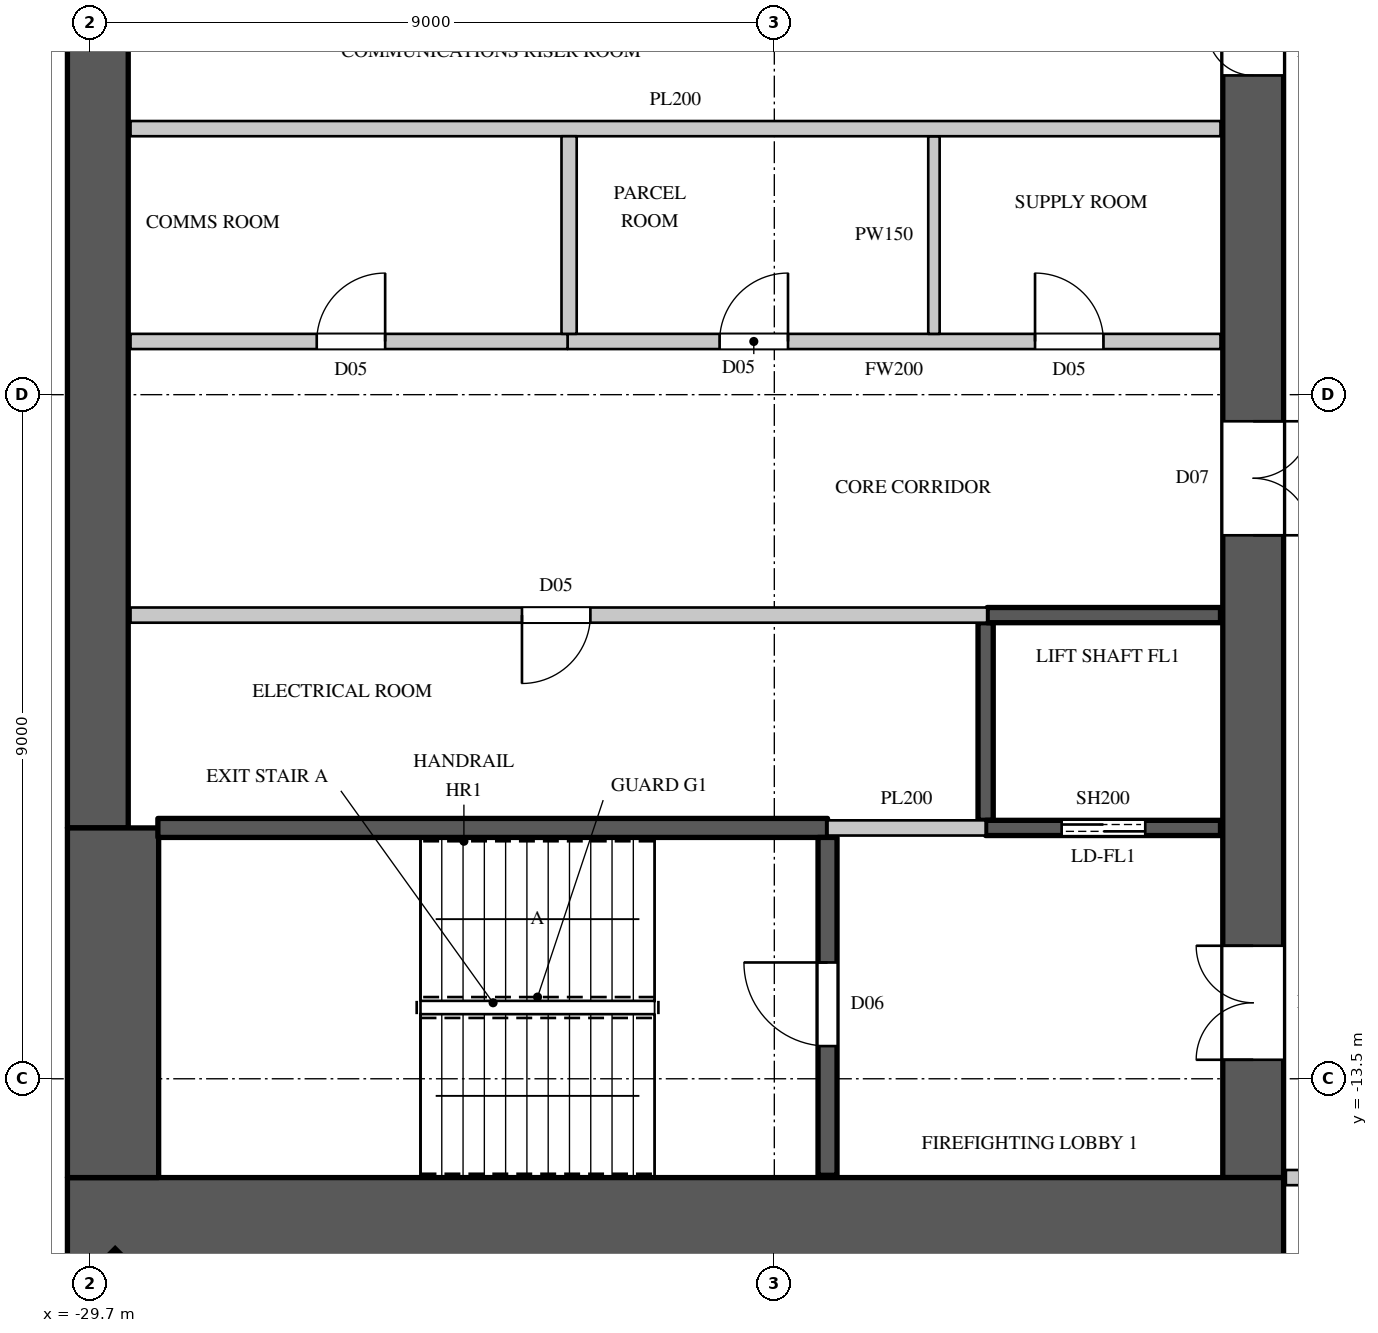
"""IFC4 building model, lengths in metres.
Left out: names, types, materials, properties, quantities, classifications, styles, units other than length and angle.
Written with IfcOpenShell. Run it as: python <this file> out.ifc"""

import sys

from ifc_helpers import new_model, si_unit, direction, frame, frame_2d, origin, origin_2d, place, context, subcontext, project, spatial, rectangle, extrude, element, fill, save


model = new_model("IFC4")
c1 = context("Model", 3, precision=1e-05, world=origin(), true_north=direction((0.0, 1.0)))
c2 = subcontext(c1, "Body", "Model", "MODEL_VIEW")
j1 = project(units=[si_unit("LENGTHUNIT", "METRE"), si_unit("PLANEANGLEUNIT", "RADIAN")], contexts=[c1])
p1 = place(None, origin())
s1 = spatial("IfcSite", under=j1, at=p1, CompositionType="ELEMENT")
p2 = place(p1, origin())
s2 = spatial("IfcBuilding", under=s1, at=p2, CompositionType="ELEMENT")
p3 = place(p2, frame((0.0, 0.0, 205.6)))
s3 = spatial("IfcBuildingStorey", under=s2, at=p3, CompositionType="ELEMENT", Elevation=205.6)
p4 = place(p3, frame((-29.443, -16.443, 0.0), z_axis=(0.0, 0.0, 1.0), x_axis=(0.707106781187, -0.707106781187, 0.0)))
e1 = element("IfcColumn", 1, at=p4, inside=s3, PredefinedType="COLUMN", context=c2, shape_type="SweptSolid", body=[
    extrude(rectangle(XDim=0.9, YDim=1.1, at=origin_2d()), origin(), (0.0, 0.0, 1.0), 4.1),
])
p5 = place(p3, frame((-30.0, -15.4, 0.0), z_axis=(0.0, 0.0, 1.0), x_axis=(1.0, 0.0, 0.0)))
e2 = element("IfcWall", 2, at=p5, inside=s3, PredefinedType="SHEAR", context=c2, shape_type="SweptSolid", body=[
    extrude(rectangle(XDim=16.0, YDim=1.2, at=frame_2d((8.0, 0.0))), origin(), (0.0, 0.0, 1.0), 4.1),
])
p6 = place(p3, frame((-14.4, -14.8, 0.0), z_axis=(0.0, 0.0, 1.0), x_axis=(0.0, 1.0, 0.0)))
e3 = element("IfcWall", 3, at=p6, inside=s3, PredefinedType="SHEAR", context=c2, shape_type="SweptSolid", body=[
    extrude(rectangle(XDim=29.6, YDim=0.8, at=frame_2d((14.8, 0.0))), origin(), (0.0, 0.0, 1.0), 4.1),
])
p7 = place(p6, frame((1.55, 0.0, 0.0)))
e4 = element("IfcOpeningElement", 4, at=p7, cuts=e3, PredefinedType="OPENING", context=c2, shape_type="SweptSolid", body=[
    extrude(rectangle(XDim=1.5, YDim=2.4, at=frame_2d((0.75, 1.2))), frame((0.0, 0.41, 0.0), z_axis=(0.0, -1.0, 0.0), x_axis=(1.0, 0.0, 0.0)), (0.0, 0.0, 1.0), 0.82),
])
p8 = place(p6, frame((26.55, 0.0, 0.0)))
e5 = element("IfcOpeningElement", 5, at=p8, cuts=e3, PredefinedType="OPENING", context=c2, shape_type="SweptSolid", body=[
    extrude(rectangle(XDim=1.5, YDim=2.4, at=frame_2d((0.75, 1.2))), frame((0.0, 0.41, 0.0), z_axis=(0.0, -1.0, 0.0), x_axis=(1.0, 0.0, 0.0)), (0.0, 0.0, 1.0), 0.82),
])
p9 = place(p6, frame((8.45, 0.0, 0.0)))
e6 = element("IfcOpeningElement", 6, at=p9, cuts=e3, PredefinedType="OPENING", context=c2, shape_type="SweptSolid", body=[
    extrude(rectangle(XDim=1.5, YDim=2.4, at=frame_2d((0.75, 1.2))), frame((0.0, 0.41, 0.0), z_axis=(0.0, -1.0, 0.0), x_axis=(1.0, 0.0, 0.0)), (0.0, 0.0, 1.0), 0.82),
])
p10 = place(p6, frame((19.65, 0.0, 0.0)))
e7 = element("IfcOpeningElement", 7, at=p10, cuts=e3, PredefinedType="OPENING", context=c2, shape_type="SweptSolid", body=[
    extrude(rectangle(XDim=1.5, YDim=2.4, at=frame_2d((0.75, 1.2))), frame((0.0, 0.41, 0.0), z_axis=(0.0, -1.0, 0.0), x_axis=(1.0, 0.0, 0.0)), (0.0, 0.0, 1.0), 0.82),
])
p11 = place(p6, frame((14.5, 0.0, 0.0)))
e8 = element("IfcOpeningElement", 8, at=p11, cuts=e3, PredefinedType="OPENING", context=c2, shape_type="SweptSolid", body=[
    extrude(rectangle(XDim=0.6, YDim=2.0, at=frame_2d((0.3, 1.0))), frame((0.0, 0.41, 0.0), z_axis=(0.0, -1.0, 0.0), x_axis=(1.0, 0.0, 0.0)), (0.0, 0.0, 1.0), 0.82),
])
p12 = place(p3, frame((-29.6, -10.2, 0.0), z_axis=(0.0, 0.0, 1.0), x_axis=(0.0, 1.0, 0.0)))
e9 = element("IfcWall", 9, at=p12, inside=s3, PredefinedType="SHEAR", context=c2, shape_type="SweptSolid", body=[
    extrude(rectangle(XDim=20.4, YDim=0.8, at=frame_2d((10.2, 0.0))), origin(), (0.0, 0.0, 1.0), 4.1),
])
p13 = place(p3, frame((-29.4, -14.8, 0.0), z_axis=(0.0, 0.0, 1.0), x_axis=(0.0, 1.0, 0.0)))
e10 = element("IfcWall", 10, at=p13, inside=s3, PredefinedType="SHEAR", context=c2, shape_type="SweptSolid", body=[
    extrude(rectangle(XDim=4.6, YDim=1.2, at=frame_2d((2.3, 0.0))), origin(), (0.0, 0.0, 1.0), 4.1),
])
p14 = place(p3, frame((-23.42, -3.8, 0.0), z_axis=(0.0, 0.0, 1.0), x_axis=(1.0, 0.0, 0.0)))
e11 = element("IfcWall", 11, at=p14, inside=s3, PredefinedType="PARTITIONING", context=c2, shape_type="SweptSolid", body=[
    extrude(rectangle(XDim=8.59, YDim=0.2, at=frame_2d((4.295, 0.0))), origin(), (0.0, 0.0, 1.0), 3.8),
])
p15 = place(p14, frame((2.0, 0.0, 0.0)))
e12 = element("IfcOpeningElement", 12, at=p15, cuts=e11, PredefinedType="OPENING", context=c2, shape_type="SweptSolid", body=[
    extrude(rectangle(XDim=0.9, YDim=2.2, at=frame_2d((0.45, 1.1))), frame((0.0, 0.11, 0.0), z_axis=(0.0, -1.0, 0.0), x_axis=(1.0, 0.0, 0.0)), (0.0, 0.0, 1.0), 0.22),
])
p16 = place(p14, frame((6.15, 0.0, 0.0)))
e13 = element("IfcOpeningElement", 13, at=p16, cuts=e11, PredefinedType="OPENING", context=c2, shape_type="SweptSolid", body=[
    extrude(rectangle(XDim=0.9, YDim=2.2, at=frame_2d((0.45, 1.1))), frame((0.0, 0.11, 0.0), z_axis=(0.0, -1.0, 0.0), x_axis=(1.0, 0.0, 0.0)), (0.0, 0.0, 1.0), 0.22),
])
p17 = place(p3, frame((-13.97, -14.8, 0.0), z_axis=(0.0, 0.0, 1.0), x_axis=(1.0, 0.0, 0.0)))
e14 = element("IfcWall", 14, at=p17, inside=s3, PredefinedType="PARTITIONING", context=c2, shape_type="SweptSolid", body=[
    extrude(rectangle(XDim=2.87, YDim=0.2, at=frame_2d((1.435, 0.0))), origin(), (0.0, 0.0, 1.0), 3.8),
])
p18 = place(p3, frame((-18.6, -3.7, 0.0), z_axis=(0.0, 0.0, 1.0), x_axis=(0.0, 1.0, 0.0)))
e15 = element("IfcWall", 15, at=p18, inside=s3, PredefinedType="PARTITIONING", context=c2, shape_type="SweptSolid", body=[
    extrude(rectangle(XDim=2.6, YDim=0.15, at=frame_2d((1.3, 0.0))), origin(), (0.0, 0.0, 1.0), 3.8),
])
p19 = place(p3, frame((-29.17, -7.4, 0.0), z_axis=(0.0, 0.0, 1.0), x_axis=(1.0, 0.0, 0.0)))
e16 = element("IfcWall", 16, at=p19, inside=s3, PredefinedType="PARTITIONING", context=c2, shape_type="SweptSolid", body=[
    extrude(rectangle(XDim=11.27, YDim=0.2, at=frame_2d((5.635, 0.0))), origin(), (0.0, 0.0, 1.0), 3.8),
])
p20 = place(p19, frame((5.15, 0.0, 0.0)))
e17 = element("IfcOpeningElement", 17, at=p20, cuts=e16, PredefinedType="OPENING", context=c2, shape_type="SweptSolid", body=[
    extrude(rectangle(XDim=0.9, YDim=2.2, at=frame_2d((0.45, 1.1))), frame((0.0, 0.11, 0.0), z_axis=(0.0, -1.0, 0.0), x_axis=(1.0, 0.0, 0.0)), (0.0, 0.0, 1.0), 0.22),
])
p21 = place(p3, frame((-29.17, -3.8, 0.0), z_axis=(0.0, 0.0, 1.0), x_axis=(1.0, 0.0, 0.0)))
e18 = element("IfcWall", 18, at=p21, inside=s3, PredefinedType="PARTITIONING", context=c2, shape_type="SweptSolid", body=[
    extrude(rectangle(XDim=5.75, YDim=0.2, at=frame_2d((2.875, 0.0))), origin(), (0.0, 0.0, 1.0), 3.8),
])
p22 = place(p21, frame((2.45, 0.0, 0.0)))
e19 = element("IfcOpeningElement", 19, at=p22, cuts=e18, PredefinedType="OPENING", context=c2, shape_type="SweptSolid", body=[
    extrude(rectangle(XDim=0.9, YDim=2.2, at=frame_2d((0.45, 1.1))), frame((0.0, 0.11, 0.0), z_axis=(0.0, -1.0, 0.0), x_axis=(1.0, 0.0, 0.0)), (0.0, 0.0, 1.0), 0.22),
])
p23 = place(p3, frame((-29.17, -1.0, 0.0), z_axis=(0.0, 0.0, 1.0), x_axis=(1.0, 0.0, 0.0)))
e20 = element("IfcWall", 20, at=p23, inside=s3, PredefinedType="PARTITIONING", context=c2, shape_type="SweptSolid", body=[
    extrude(rectangle(XDim=14.34, YDim=0.2, at=frame_2d((7.17, 0.0))), origin(), (0.0, 0.0, 1.0), 3.8),
])
p24 = place(p3, frame((-23.4, -3.7, 0.0), z_axis=(0.0, 0.0, 1.0), x_axis=(0.0, 1.0, 0.0)))
e21 = element("IfcWall", 21, at=p24, inside=s3, PredefinedType="PARTITIONING", context=c2, shape_type="SweptSolid", body=[
    extrude(rectangle(XDim=2.6, YDim=0.2, at=frame_2d((1.3, 0.0))), origin(), (0.0, 0.0, 1.0), 3.8),
])
p25 = place(p3, frame((-20.0, -10.2, 0.0), z_axis=(0.0, 0.0, 1.0), x_axis=(1.0, 0.0, 0.0)))
e22 = element("IfcWall", 22, at=p25, inside=s3, PredefinedType="PARTITIONING", context=c2, shape_type="SweptSolid", body=[
    extrude(rectangle(XDim=2.08, YDim=0.2, at=frame_2d((1.04, 0.0))), origin(), (0.0, 0.0, 1.0), 3.8),
])
p26 = place(p3, frame((-17.92, -10.1, 0.0), z_axis=(0.0, 0.0, 1.0), x_axis=(0.0, 1.0, 0.0)))
e23 = element("IfcWall", 23, at=p26, inside=s3, PredefinedType="SHEAR", context=c2, shape_type="SweptSolid", body=[
    extrude(rectangle(XDim=2.6, YDim=0.2, at=frame_2d((1.3, 0.0))), origin(), (0.0, 0.0, 1.0), 3.8),
])
p27 = place(p3, frame((-17.92, -10.2, 0.0), z_axis=(0.0, 0.0, 1.0), x_axis=(1.0, 0.0, 0.0)))
e24 = element("IfcWall", 24, at=p27, inside=s3, PredefinedType="SHEAR", context=c2, shape_type="SweptSolid", body=[
    extrude(rectangle(XDim=3.09, YDim=0.2, at=frame_2d((1.545, 0.0))), origin(), (0.0, 0.0, 1.0), 3.8),
])
p28 = place(p27, frame((1.0, 0.0, 0.0)))
e25 = element("IfcOpeningElement", 25, at=p28, cuts=e24, PredefinedType="OPENING", context=c2, shape_type="SweptSolid", body=[
    extrude(rectangle(XDim=1.1, YDim=2.2, at=frame_2d((0.55, 1.1))), frame((0.0, 0.11, 0.0), z_axis=(0.0, -1.0, 0.0), x_axis=(1.0, 0.0, 0.0)), (0.0, 0.0, 1.0), 0.22),
])
p29 = place(p3, frame((-17.9, -7.4, 0.0), z_axis=(0.0, 0.0, 1.0), x_axis=(1.0, 0.0, 0.0)))
e26 = element("IfcWall", 26, at=p29, inside=s3, PredefinedType="SHEAR", context=c2, shape_type="SweptSolid", body=[
    extrude(rectangle(XDim=3.07, YDim=0.2, at=frame_2d((1.535, 0.0))), origin(), (0.0, 0.0, 1.0), 3.8),
])
p30 = place(p3, frame((-28.81, -10.2, 0.0), z_axis=(0.0, 0.0, 1.0), x_axis=(1.0, 0.0, 0.0)))
e27 = element("IfcWall", 27, at=p30, inside=s3, PredefinedType="SHEAR", context=c2, shape_type="SweptSolid", body=[
    extrude(rectangle(XDim=8.81, YDim=0.25, at=frame_2d((4.405, 0.0))), origin(), (0.0, 0.0, 1.0), 3.8),
])
p31 = place(p3, frame((-20.0, -14.77, 0.0), z_axis=(0.0, 0.0, 1.0), x_axis=(0.0, 1.0, 0.0)))
e28 = element("IfcWall", 28, at=p31, inside=s3, PredefinedType="SHEAR", context=c2, shape_type="SweptSolid", body=[
    extrude(rectangle(XDim=4.445, YDim=0.25, at=frame_2d((2.223, 0.0))), origin(), (0.0, 0.0, 1.0), 3.8),
])
p32 = place(p31, frame((1.7, 0.0, 0.0)))
e29 = element("IfcOpeningElement", 29, at=p32, cuts=e28, PredefinedType="OPENING", context=c2, shape_type="SweptSolid", body=[
    extrude(rectangle(XDim=1.1, YDim=2.2, at=frame_2d((0.55, 1.1))), frame((0.0, 0.135, 0.0), z_axis=(0.0, -1.0, 0.0), x_axis=(1.0, 0.0, 0.0)), (0.0, 0.0, 1.0), 0.27),
])
p33 = place(p32, origin())
e30 = element("IfcDoor", 30, at=p33, inside=s3, OperationType="SINGLE_SWING_RIGHT", PredefinedType="DOOR", context=c2, shape_type="SweptSolid", body=[
    extrude(rectangle(XDim=1.1, YDim=2.2, at=frame_2d((0.55, 1.1))), frame((0.0, 0.025, 0.0), z_axis=(0.0, -1.0, 0.0), x_axis=(1.0, 0.0, 0.0)), (0.0, 0.0, 1.0), 0.05),
])
fill(e29, e30)
p34 = place(p20, origin())
e31 = element("IfcDoor", 31, at=p34, inside=s3, OperationType="SINGLE_SWING_RIGHT", PredefinedType="DOOR", context=c2, shape_type="SweptSolid", body=[
    extrude(rectangle(XDim=0.9, YDim=2.2, at=frame_2d((0.45, 1.1))), frame((0.0, 0.025, 0.0), z_axis=(0.0, -1.0, 0.0), x_axis=(1.0, 0.0, 0.0)), (0.0, 0.0, 1.0), 0.05),
])
fill(e17, e31)
p35 = place(p22, origin())
e32 = element("IfcDoor", 32, at=p35, inside=s3, OperationType="SINGLE_SWING_RIGHT", PredefinedType="DOOR", context=c2, shape_type="SweptSolid", body=[
    extrude(rectangle(XDim=0.9, YDim=2.2, at=frame_2d((0.45, 1.1))), frame((0.0, 0.025, 0.0), z_axis=(0.0, -1.0, 0.0), x_axis=(1.0, 0.0, 0.0)), (0.0, 0.0, 1.0), 0.05),
])
fill(e19, e32)
p36 = place(p15, origin())
e33 = element("IfcDoor", 33, at=p36, inside=s3, OperationType="SINGLE_SWING_RIGHT", PredefinedType="DOOR", context=c2, shape_type="SweptSolid", body=[
    extrude(rectangle(XDim=0.9, YDim=2.2, at=frame_2d((0.45, 1.1))), frame((0.0, 0.025, 0.0), z_axis=(0.0, -1.0, 0.0), x_axis=(1.0, 0.0, 0.0)), (0.0, 0.0, 1.0), 0.05),
])
fill(e12, e33)
p37 = place(p16, origin())
e34 = element("IfcDoor", 34, at=p37, inside=s3, OperationType="SINGLE_SWING_LEFT", PredefinedType="DOOR", context=c2, shape_type="SweptSolid", body=[
    extrude(rectangle(XDim=0.9, YDim=2.2, at=frame_2d((0.45, 1.1))), frame((0.0, 0.025, 0.0), z_axis=(0.0, -1.0, 0.0), x_axis=(1.0, 0.0, 0.0)), (0.0, 0.0, 1.0), 0.05),
])
fill(e13, e34)
p38 = place(p28, origin())
e35 = element("IfcDoor", 35, at=p38, inside=s3, OperationType="DOUBLE_DOOR_SLIDING", PredefinedType="DOOR", context=c2, shape_type="SweptSolid", body=[
    extrude(rectangle(XDim=1.1, YDim=2.2, at=frame_2d((0.55, 1.1))), frame((0.0, 0.025, 0.0), z_axis=(0.0, -1.0, 0.0), x_axis=(1.0, 0.0, 0.0)), (0.0, 0.0, 1.0), 0.05),
])
fill(e25, e35)
p39 = place(p7, origin())
e36 = element("IfcDoor", 36, at=p39, inside=s3, OperationType="DOUBLE_DOOR_SINGLE_SWING", PredefinedType="DOOR", context=c2, shape_type="SweptSolid", body=[
    extrude(rectangle(XDim=1.5, YDim=2.4, at=frame_2d((0.75, 1.2))), frame((0.0, 0.395, 0.0), z_axis=(0.0, -1.0, 0.0), x_axis=(1.0, 0.0, 0.0)), (0.0, 0.0, 1.0), 0.05),
])
fill(e4, e36)
p40 = place(p9, origin())
e37 = element("IfcDoor", 37, at=p40, inside=s3, OperationType="DOUBLE_DOOR_SINGLE_SWING", PredefinedType="DOOR", context=c2, shape_type="SweptSolid", body=[
    extrude(rectangle(XDim=1.5, YDim=2.4, at=frame_2d((0.75, 1.2))), frame((0.0, -0.345, 0.0), z_axis=(0.0, -1.0, 0.0), x_axis=(1.0, 0.0, 0.0)), (0.0, 0.0, 1.0), 0.05),
])
fill(e6, e37)
p41 = place(p11, origin())
e38 = element("IfcDoor", 38, at=p41, inside=s3, OperationType="SINGLE_SWING_RIGHT", PredefinedType="DOOR", context=c2, shape_type="SweptSolid", body=[
    extrude(rectangle(XDim=0.6, YDim=2.0, at=frame_2d((0.3, 1.0))), frame((0.0, 0.395, 0.0), z_axis=(0.0, -1.0, 0.0), x_axis=(1.0, 0.0, 0.0)), (0.0, 0.0, 1.0), 0.05),
])
fill(e8, e38)
save(model, sys.argv[1])
